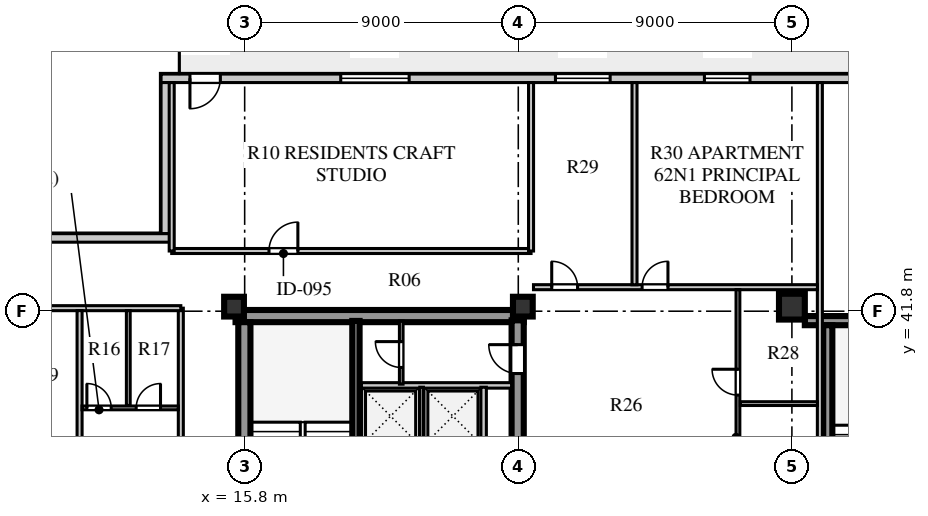
"""IFC4 building model, lengths in metres.
Left out: names, types, materials, properties, quantities, classifications, styles, units other than length and angle.
Written with IfcOpenShell. Run it as: python <this file> out.ifc"""

import sys

from ifc_helpers import new_model, si_unit, direction, frame, frame_2d, origin, origin_2d, place, context, subcontext, project, spatial, rectangle, extrude, element, fill, save


model = new_model("IFC4")
c1 = context("Model", 3, precision=1e-05, world=origin(), true_north=direction((0.0, 1.0)))
c2 = subcontext(c1, "Body", "Model", "MODEL_VIEW")
j1 = project(units=[si_unit("LENGTHUNIT", "METRE"), si_unit("PLANEANGLEUNIT", "RADIAN")], contexts=[c1])
p1 = place(None, origin())
s1 = spatial("IfcSite", under=j1, at=p1, CompositionType="ELEMENT")
p2 = place(p1, origin())
s2 = spatial("IfcBuilding", under=s1, at=p2, CompositionType="ELEMENT")
p3 = place(p2, frame((0.0, 0.0, 253.1)))
s3 = spatial("IfcBuildingStorey", under=s2, at=p3, CompositionType="ELEMENT", Elevation=253.1)
p4 = place(p3, frame((15.5, 41.64, 0.0), z_axis=(0.0, 0.0, 1.0), x_axis=(1.0, 0.0, 0.0)))
e1 = element("IfcWall", 1, at=p4, inside=s3, PredefinedType="SHEAR", context=c2, shape_type="SweptSolid", body=[
    extrude(rectangle(XDim=9.48, YDim=0.4, at=frame_2d((4.74, 0.0))), origin(), (0.0, 0.0, 1.0), 3.66),
])
p5 = place(p3, frame((15.79, 15.81, 0.0), z_axis=(0.0, 0.0, 1.0), x_axis=(0.0, 1.0, 0.0)))
e2 = element("IfcWall", 2, at=p5, inside=s3, PredefinedType="SHEAR", context=c2, shape_type="SweptSolid", body=[
    extrude(rectangle(XDim=25.63, YDim=0.4, at=frame_2d((12.815, 0.0))), origin(), (0.0, 0.0, 1.0), 3.66),
])
p6 = place(p3, frame((24.78, 15.74, 0.0), z_axis=(0.0, 0.0, 1.0), x_axis=(0.0, 1.0, 0.0)))
e3 = element("IfcWall", 3, at=p6, inside=s3, PredefinedType="SHEAR", context=c2, shape_type="SweptSolid", body=[
    extrude(rectangle(XDim=25.76, YDim=0.4, at=frame_2d((12.88, 0.0))), origin(), (0.0, 0.0, 1.0), 3.66),
])
p7 = place(p6, frame((1.61, 0.0, 0.0)))
e4 = element("IfcOpeningElement", 4, at=p7, cuts=e3, PredefinedType="OPENING", context=c2, shape_type="SweptSolid", body=[
    extrude(rectangle(XDim=1.2, YDim=2.1, at=frame_2d((0.6, 1.05))), frame((0.0, 0.21, 0.0), z_axis=(0.0, -1.0, 0.0), x_axis=(1.0, 0.0, 0.0)), (0.0, 0.0, 1.0), 0.42),
])
p8 = place(p6, frame((6.78, 0.0, 0.0)))
e5 = element("IfcOpeningElement", 5, at=p8, cuts=e3, PredefinedType="OPENING", context=c2, shape_type="SweptSolid", body=[
    extrude(rectangle(XDim=0.85, YDim=2.06, at=frame_2d((0.425, 1.03))), frame((0.0, 0.21, 0.0), z_axis=(0.0, -1.0, 0.0), x_axis=(1.0, 0.0, 0.0)), (0.0, 0.0, 1.0), 0.42),
])
p9 = place(p6, frame((12.11, 0.0, 0.0)))
e6 = element("IfcOpeningElement", 6, at=p9, cuts=e3, PredefinedType="OPENING", context=c2, shape_type="SweptSolid", body=[
    extrude(rectangle(XDim=1.5, YDim=2.12, at=frame_2d((0.75, 1.06))), frame((0.0, 0.21, 0.0), z_axis=(0.0, -1.0, 0.0), x_axis=(1.0, 0.0, 0.0)), (0.0, 0.0, 1.0), 0.42),
])
p10 = place(p6, frame((20.11, 0.0, 0.0)))
e7 = element("IfcOpeningElement", 7, at=p10, cuts=e3, PredefinedType="OPENING", context=c2, shape_type="SweptSolid", body=[
    extrude(rectangle(XDim=1.2, YDim=2.12, at=frame_2d((0.6, 1.06))), frame((0.0, 0.21, 0.0), z_axis=(0.0, -1.0, 0.0), x_axis=(1.0, 0.0, 0.0)), (0.0, 0.0, 1.0), 0.42),
])
p11 = place(p6, frame((24.01, 0.0, 0.0)))
e8 = element("IfcOpeningElement", 8, at=p11, cuts=e3, PredefinedType="OPENING", context=c2, shape_type="SweptSolid", body=[
    extrude(rectangle(XDim=0.95, YDim=2.1, at=frame_2d((0.475, 1.05))), frame((0.0, 0.21, 0.0), z_axis=(0.0, -1.0, 0.0), x_axis=(1.0, 0.0, 0.0)), (0.0, 0.0, 1.0), 0.42),
])
p12 = place(p3, frame((34.225, 41.49, 0.0), z_axis=(0.0, 0.0, 1.0), x_axis=(1.0, 0.0, 0.0)))
e9 = element("IfcWall", 9, at=p12, inside=s3, PredefinedType="SHEAR", context=c2, shape_type="SweptSolid", body=[
    extrude(rectangle(XDim=4.645, YDim=0.3, at=frame_2d((2.323, 0.0))), origin(), (0.0, 0.0, 1.0), 3.66),
])
p13 = place(p3, frame((34.98, 33.31, 0.0), z_axis=(0.0, 0.0, 1.0), x_axis=(0.0, 1.0, 0.0)))
e10 = element("IfcWall", 10, at=p13, inside=s3, PredefinedType="SHEAR", context=c2, shape_type="SweptSolid", body=[
    extrude(rectangle(XDim=8.03, YDim=0.3, at=frame_2d((4.015, 0.0))), origin(), (0.0, 0.0, 1.0), 3.66),
])
p14 = place(p13, frame((0.35, 0.0, 0.0)))
e11 = element("IfcOpeningElement", 11, at=p14, cuts=e10, PredefinedType="OPENING", context=c2, shape_type="SweptSolid", body=[
    extrude(rectangle(XDim=1.1, YDim=2.1, at=frame_2d((0.55, 1.05))), frame((0.0, 0.16, 0.0), z_axis=(0.0, -1.0, 0.0), x_axis=(1.0, 0.0, 0.0)), (0.0, 0.0, 1.0), 0.32),
])
for number, where, z_axis, x_axis in (
    (12, (15.45, 41.95, 0.0), (0.0, 0.0, 1.0), (1.0, 0.0, 0.0)),
    (13, (24.95, 41.95, 0.0), (0.0, 0.0, 1.0), (1.0, 0.0, 0.0)),
):
    element("IfcColumn", number, at=place(p3, frame(where, z_axis=z_axis, x_axis=x_axis)), inside=s3, PredefinedType="COLUMN", context=c2, shape_type="SweptSolid", body=[
        extrude(rectangle(XDim=0.65, YDim=0.65, at=origin_2d()), origin(), (0.0, 0.0, 1.0), 3.66),
    ])
p15 = place(p3, frame((33.8, 41.95, 0.0), z_axis=(0.0, 0.0, 1.0), x_axis=(1.0, 0.0, 0.0)))
e14 = element("IfcColumn", 14, at=p15, inside=s3, PredefinedType="COLUMN", context=c2, shape_type="SweptSolid", body=[
    extrude(rectangle(XDim=0.85, YDim=0.85, at=origin_2d()), origin(), (0.0, 0.0, 1.0), 3.66),
])
p16 = place(p3, frame((45.55, 49.46, 0.0), z_axis=(0.0, 0.0, 1.0), x_axis=(-1.0, 0.0, 0.0)))
e15 = element("IfcWall", 15, at=p16, inside=s3, PredefinedType="STANDARD", context=c2, shape_type="SweptSolid", body=[
    extrude(rectangle(XDim=32.5, YDim=0.28, at=frame_2d((16.25, 0.0))), origin(), (0.0, 0.0, 1.0), 3.66),
])
p17 = place(p16, frame((30.55, 0.0, 0.0)))
e16 = element("IfcOpeningElement", 16, at=p17, cuts=e15, PredefinedType="OPENING", context=c2, shape_type="SweptSolid", body=[
    extrude(rectangle(XDim=1.0, YDim=2.05, at=frame_2d((0.5, 1.025))), frame((0.0, 0.15, 0.0), z_axis=(0.0, -1.0, 0.0), x_axis=(1.0, 0.0, 0.0)), (0.0, 0.0, 1.0), 0.3),
])
p18 = place(p16, frame((24.34, 0.0, 0.8)))
e17 = element("IfcOpeningElement", 17, at=p18, cuts=e15, PredefinedType="OPENING", context=c2, shape_type="SweptSolid", body=[
    extrude(rectangle(XDim=2.25, YDim=2.0, at=frame_2d((1.125, 1.0))), frame((0.0, 0.15, 0.0), z_axis=(0.0, -1.0, 0.0), x_axis=(1.0, 0.0, 0.0)), (0.0, 0.0, 1.0), 0.3),
])
p19 = place(p16, frame((17.728, 0.0, 0.8)))
e18 = element("IfcOpeningElement", 18, at=p19, cuts=e15, PredefinedType="OPENING", context=c2, shape_type="SweptSolid", body=[
    extrude(rectangle(XDim=1.8, YDim=2.0, at=frame_2d((0.9, 1.0))), frame((0.0, 0.15, 0.0), z_axis=(0.0, -1.0, 0.0), x_axis=(1.0, 0.0, 0.0)), (0.0, 0.0, 1.0), 0.3),
])
p20 = place(p16, frame((13.128, 0.0, 0.8)))
e19 = element("IfcOpeningElement", 19, at=p20, cuts=e15, PredefinedType="OPENING", context=c2, shape_type="SweptSolid", body=[
    extrude(rectangle(XDim=1.5, YDim=2.0, at=frame_2d((0.75, 1.0))), frame((0.0, 0.15, 0.0), z_axis=(0.0, -1.0, 0.0), x_axis=(1.0, 0.0, 0.0)), (0.0, 0.0, 1.0), 0.3),
])
p21 = place(p16, frame((4.87, 0.0, 0.8)))
e20 = element("IfcOpeningElement", 20, at=p21, cuts=e15, PredefinedType="OPENING", context=c2, shape_type="SweptSolid", body=[
    extrude(rectangle(XDim=1.2, YDim=1.75, at=frame_2d((0.6, 0.875))), frame((0.0, 0.15, 0.0), z_axis=(0.0, -1.0, 0.0), x_axis=(1.0, 0.0, 0.0)), (0.0, 0.0, 1.0), 0.3),
])
p22 = place(p3, frame((13.19, 49.32, 0.0), z_axis=(0.0, 0.0, 1.0), x_axis=(0.0, -1.0, 0.0)))
e21 = element("IfcWall", 21, at=p22, inside=s3, PredefinedType="STANDARD", context=c2, shape_type="SweptSolid", body=[
    extrude(rectangle(XDim=4.97, YDim=0.28, at=frame_2d((2.485, 0.0))), origin(), (0.0, 0.0, 1.0), 3.66),
])
p23 = place(p3, frame((13.33, 44.21, 0.0), z_axis=(0.0, 0.0, 1.0), x_axis=(-1.0, 0.0, 0.0)))
e22 = element("IfcWall", 22, at=p23, inside=s3, PredefinedType="STANDARD", context=c2, shape_type="SweptSolid", body=[
    extrude(rectangle(XDim=5.53, YDim=0.28, at=frame_2d((2.765, 0.0))), origin(), (0.0, 0.0, 1.0), 3.66),
])
p24 = place(p3, frame((19.46, 33.3, 0.0), z_axis=(0.0, 0.0, 1.0), x_axis=(0.0, 1.0, 0.0)))
e23 = element("IfcWall", 23, at=p24, inside=s3, PredefinedType="SHEAR", context=c2, shape_type="SweptSolid", body=[
    extrude(rectangle(XDim=8.18, YDim=0.24, at=frame_2d((4.09, 0.0))), origin(), (0.0, 0.0, 1.0), 3.9),
])
p25 = place(p24, frame((0.65, 0.0, 0.0)))
e24 = element("IfcOpeningElement", 24, at=p25, cuts=e23, PredefinedType="OPENING", context=c2, shape_type="SweptSolid", body=[
    extrude(rectangle(XDim=1.1, YDim=2.1, at=frame_2d((0.55, 1.05))), frame((0.0, 0.13, 0.0), z_axis=(0.0, -1.0, 0.0), x_axis=(1.0, 0.0, 0.0)), (0.0, 0.0, 1.0), 0.26),
])
p26 = place(p3, frame((19.64, 39.36, 0.0), z_axis=(0.0, 0.0, 1.0), x_axis=(1.0, 0.0, 0.0)))
e25 = element("IfcWall", 25, at=p26, inside=s3, PredefinedType="SOLIDWALL", context=c2, shape_type="SweptSolid", body=[
    extrude(rectangle(XDim=4.94, YDim=0.18, at=frame_2d((2.47, 0.0))), origin(), (0.0, 0.0, 1.0), 3.66),
])
p27 = place(p3, frame((21.62, 37.4, 0.0), z_axis=(0.0, 0.0, 1.0), x_axis=(0.0, 1.0, 0.0)))
e26 = element("IfcWall", 26, at=p27, inside=s3, PredefinedType="PARTITIONING", context=c2, shape_type="SweptSolid", body=[
    extrude(rectangle(XDim=1.9, YDim=0.12, at=frame_2d((0.95, 0.0))), origin(), (0.0, 0.0, 1.0), 3.66),
])
p28 = place(p3, frame((23.66, 37.4, 0.0), z_axis=(0.0, 0.0, 1.0), x_axis=(0.0, 1.0, 0.0)))
e27 = element("IfcWall", 27, at=p28, inside=s3, PredefinedType="SOLIDWALL", context=c2, shape_type="SweptSolid", body=[
    extrude(rectangle(XDim=1.9, YDim=0.18, at=frame_2d((0.95, 0.0))), origin(), (0.0, 0.0, 1.0), 3.66),
])
p29 = place(p3, frame((20.95, 39.4, 0.0), z_axis=(0.0, 0.0, 1.0), x_axis=(0.0, 1.0, 0.0)))
e28 = element("IfcWall", 28, at=p29, inside=s3, PredefinedType="PARTITIONING", context=c2, shape_type="SweptSolid", body=[
    extrude(rectangle(XDim=2.08, YDim=0.12, at=frame_2d((1.04, 0.0))), origin(), (0.0, 0.0, 1.0), 3.66),
])
p30 = place(p29, frame((0.55, 0.0, 0.0)))
e29 = element("IfcOpeningElement", 29, at=p30, cuts=e28, PredefinedType="OPENING", context=c2, shape_type="SweptSolid", body=[
    extrude(rectangle(XDim=0.85, YDim=2.06, at=frame_2d((0.425, 1.03))), frame((0.0, 0.07, 0.0), z_axis=(0.0, -1.0, 0.0), x_axis=(1.0, 0.0, 0.0)), (0.0, 0.0, 1.0), 0.14),
])
p31 = place(p3, frame((13.4, 43.78, 0.0), z_axis=(0.0, 0.0, 1.0), x_axis=(1.0, 0.0, 0.0)))
e30 = element("IfcWall", 30, at=p31, inside=s3, PredefinedType="PARTITIONING", context=c2, shape_type="SweptSolid", body=[
    extrude(rectangle(XDim=11.82, YDim=0.165, at=frame_2d((5.91, 0.0))), origin(), (0.0, 0.0, 1.0), 3.66),
])
p32 = place(p31, frame((3.2, 0.0, 0.0)))
e31 = element("IfcOpeningElement", 31, at=p32, cuts=e30, PredefinedType="OPENING", context=c2, shape_type="SweptSolid", body=[
    extrude(rectangle(XDim=0.95, YDim=2.08, at=frame_2d((0.475, 1.04))), frame((0.0, 0.093, 0.0), z_axis=(0.0, -1.0, 0.0), x_axis=(1.0, 0.0, 0.0)), (0.0, 0.0, 1.0), 0.185),
])
p33 = place(p3, frame((13.4, 43.78, 0.0), z_axis=(0.0, 0.0, 1.0), x_axis=(0.0, 1.0, 0.0)))
e32 = element("IfcWall", 32, at=p33, inside=s3, PredefinedType="PARTITIONING", context=c2, shape_type="SweptSolid", body=[
    extrude(rectangle(XDim=5.54, YDim=0.165, at=frame_2d((2.77, 0.0))), origin(), (0.0, 0.0, 1.0), 3.66),
])
p34 = place(p3, frame((25.22, 43.78, 0.0), z_axis=(0.0, 0.0, 1.0), x_axis=(0.0, 1.0, 0.0)))
e33 = element("IfcWall", 33, at=p34, inside=s3, PredefinedType="PARTITIONING", context=c2, shape_type="SweptSolid", body=[
    extrude(rectangle(XDim=5.54, YDim=0.165, at=frame_2d((2.77, 0.0))), origin(), (0.0, 0.0, 1.0), 3.21),
])
p35 = place(p3, frame((13.7, 15.3, 0.0), z_axis=(0.0, 0.0, 1.0), x_axis=(0.0, 1.0, 0.0)))
e34 = element("IfcWall", 34, at=p35, inside=s3, PredefinedType="PARTITIONING", context=c2, shape_type="SweptSolid", body=[
    extrude(rectangle(XDim=26.6, YDim=0.165, at=frame_2d((13.3, 0.0))), origin(), (0.0, 0.0, 1.0), 3.66),
])
p36 = place(p35, frame((0.65, 0.0, 0.0)))
e35 = element("IfcOpeningElement", 35, at=p36, cuts=e34, PredefinedType="OPENING", context=c2, shape_type="SweptSolid", body=[
    extrude(rectangle(XDim=0.95, YDim=2.1, at=frame_2d((0.475, 1.05))), frame((0.0, 0.093, 0.0), z_axis=(0.0, -1.0, 0.0), x_axis=(1.0, 0.0, 0.0)), (0.0, 0.0, 1.0), 0.185),
])
p37 = place(p35, frame((15.95, 0.0, 0.0)))
e36 = element("IfcOpeningElement", 36, at=p37, cuts=e34, PredefinedType="OPENING", context=c2, shape_type="SweptSolid", body=[
    extrude(rectangle(XDim=0.95, YDim=2.1, at=frame_2d((0.475, 1.05))), frame((0.0, 0.093, 0.0), z_axis=(0.0, -1.0, 0.0), x_axis=(1.0, 0.0, 0.0)), (0.0, 0.0, 1.0), 0.185),
])
p38 = place(p3, frame((8.08, 41.9, 0.0), z_axis=(0.0, 0.0, 1.0), x_axis=(1.0, 0.0, 0.0)))
e37 = element("IfcWall", 37, at=p38, inside=s3, PredefinedType="PARTITIONING", context=c2, shape_type="SweptSolid", body=[
    extrude(rectangle(XDim=5.62, YDim=0.165, at=frame_2d((2.81, 0.0))), origin(), (0.0, 0.0, 1.0), 3.21),
])
p39 = place(p3, frame((10.37, 30.68, 0.0), z_axis=(0.0, 0.0, 1.0), x_axis=(0.0, 1.0, 0.0)))
e38 = element("IfcWall", 38, at=p39, inside=s3, PredefinedType="PARTITIONING", context=c2, shape_type="SweptSolid", body=[
    extrude(rectangle(XDim=11.14, YDim=0.165, at=frame_2d((5.57, 0.0))), origin(), (0.0, 0.0, 1.0), 3.66),
])
p40 = place(p39, frame((4.52, 0.0, 0.0)))
e39 = element("IfcOpeningElement", 39, at=p40, cuts=e38, PredefinedType="OPENING", context=c2, shape_type="SweptSolid", body=[
    extrude(rectangle(XDim=0.85, YDim=2.08, at=frame_2d((0.425, 1.04))), frame((0.0, 0.093, 0.0), z_axis=(0.0, -1.0, 0.0), x_axis=(1.0, 0.0, 0.0)), (0.0, 0.0, 1.0), 0.185),
])
p41 = place(p39, frame((5.82, 0.0, 0.0)))
e40 = element("IfcOpeningElement", 40, at=p41, cuts=e38, PredefinedType="OPENING", context=c2, shape_type="SweptSolid", body=[
    extrude(rectangle(XDim=0.85, YDim=2.08, at=frame_2d((0.425, 1.04))), frame((0.0, 0.093, 0.0), z_axis=(0.0, -1.0, 0.0), x_axis=(1.0, 0.0, 0.0)), (0.0, 0.0, 1.0), 0.185),
])
p42 = place(p3, frame((10.45, 38.62, 0.0), z_axis=(0.0, 0.0, 1.0), x_axis=(1.0, 0.0, 0.0)))
e41 = element("IfcWall", 41, at=p42, inside=s3, PredefinedType="PLUMBINGWALL", context=c2, shape_type="SweptSolid", body=[
    extrude(rectangle(XDim=3.17, YDim=0.125, at=frame_2d((1.585, 0.0))), origin(), (0.0, 0.0, 1.0), 3.66),
])
p43 = place(p42, frame((0.16, 0.0, 0.0)))
e42 = element("IfcOpeningElement", 42, at=p43, cuts=e41, PredefinedType="OPENING", context=c2, shape_type="SweptSolid", body=[
    extrude(rectangle(XDim=0.8, YDim=2.05, at=frame_2d((0.4, 1.025))), frame((0.0, 0.073, 0.0), z_axis=(0.0, -1.0, 0.0), x_axis=(1.0, 0.0, 0.0)), (0.0, 0.0, 1.0), 0.145),
])
p44 = place(p42, frame((1.782, 0.0, 0.0)))
e43 = element("IfcOpeningElement", 43, at=p44, cuts=e41, PredefinedType="OPENING", context=c2, shape_type="SweptSolid", body=[
    extrude(rectangle(XDim=0.8, YDim=2.05, at=frame_2d((0.4, 1.025))), frame((0.0, 0.073, 0.0), z_axis=(0.0, -1.0, 0.0), x_axis=(1.0, 0.0, 0.0)), (0.0, 0.0, 1.0), 0.145),
])
p45 = place(p3, frame((11.972, 38.7, 0.0), z_axis=(0.0, 0.0, 1.0), x_axis=(0.0, 1.0, 0.0)))
e44 = element("IfcWall", 44, at=p45, inside=s3, PredefinedType="PLUMBINGWALL", context=c2, shape_type="SweptSolid", body=[
    extrude(rectangle(XDim=3.12, YDim=0.125, at=frame_2d((1.56, 0.0))), origin(), (0.0, 0.0, 1.0), 3.66),
])
p46 = place(p3, frame((34.72, 35.22, 0.0), z_axis=(0.0, 0.0, 1.0), x_axis=(0.0, 1.0, 0.0)))
e45 = element("IfcWall", 45, at=p46, inside=s3, PredefinedType="PARTITIONING", context=c2, shape_type="SweptSolid", body=[
    extrude(rectangle(XDim=14.1, YDim=0.165, at=frame_2d((7.05, 0.0))), origin(), (0.0, 0.0, 1.0), 3.66),
])
p47 = place(p3, frame((25.3, 42.59, 0.0), z_axis=(0.0, 0.0, 1.0), x_axis=(1.0, 0.0, 0.0)))
e46 = element("IfcWall", 46, at=p47, inside=s3, PredefinedType="PARTITIONING", context=c2, shape_type="SweptSolid", body=[
    extrude(rectangle(XDim=9.34, YDim=0.165, at=frame_2d((4.67, 0.0))), origin(), (0.0, 0.0, 1.0), 3.66),
])
p48 = place(p47, frame((0.6, 0.0, 0.0)))
e47 = element("IfcOpeningElement", 47, at=p48, cuts=e46, PredefinedType="OPENING", context=c2, shape_type="SweptSolid", body=[
    extrude(rectangle(XDim=0.85, YDim=2.08, at=frame_2d((0.425, 1.04))), frame((0.0, 0.093, 0.0), z_axis=(0.0, -1.0, 0.0), x_axis=(1.0, 0.0, 0.0)), (0.0, 0.0, 1.0), 0.185),
])
p49 = place(p47, frame((3.573, 0.0, 0.0)))
e48 = element("IfcOpeningElement", 48, at=p49, cuts=e46, PredefinedType="OPENING", context=c2, shape_type="SweptSolid", body=[
    extrude(rectangle(XDim=0.85, YDim=2.08, at=frame_2d((0.425, 1.04))), frame((0.0, 0.093, 0.0), z_axis=(0.0, -1.0, 0.0), x_axis=(1.0, 0.0, 0.0)), (0.0, 0.0, 1.0), 0.185),
])
p50 = place(p3, frame((32.025, 35.3, 0.0), z_axis=(0.0, 0.0, 1.0), x_axis=(0.0, 1.0, 0.0)))
e49 = element("IfcWall", 49, at=p50, inside=s3, PredefinedType="PLUMBINGWALL", context=c2, shape_type="SweptSolid", body=[
    extrude(rectangle(XDim=7.21, YDim=0.125, at=frame_2d((3.605, 0.0))), origin(), (0.0, 0.0, 1.0), 3.66),
])
p51 = place(p50, frame((0.16, 0.0, 0.0)))
e50 = element("IfcOpeningElement", 50, at=p51, cuts=e49, PredefinedType="OPENING", context=c2, shape_type="SweptSolid", body=[
    extrude(rectangle(XDim=0.8, YDim=2.05, at=frame_2d((0.4, 1.025))), frame((0.0, 0.073, 0.0), z_axis=(0.0, -1.0, 0.0), x_axis=(1.0, 0.0, 0.0)), (0.0, 0.0, 1.0), 0.145),
])
p52 = place(p50, frame((3.741, 0.0, 0.0)))
e51 = element("IfcOpeningElement", 51, at=p52, cuts=e49, PredefinedType="OPENING", context=c2, shape_type="SweptSolid", body=[
    extrude(rectangle(XDim=0.85, YDim=2.08, at=frame_2d((0.425, 1.04))), frame((0.0, 0.073, 0.0), z_axis=(0.0, -1.0, 0.0), x_axis=(1.0, 0.0, 0.0)), (0.0, 0.0, 1.0), 0.145),
])
p53 = place(p3, frame((32.105, 38.761, 0.0), z_axis=(0.0, 0.0, 1.0), x_axis=(1.0, 0.0, 0.0)))
e52 = element("IfcWall", 52, at=p53, inside=s3, PredefinedType="PLUMBINGWALL", context=c2, shape_type="SweptSolid", body=[
    extrude(rectangle(XDim=2.535, YDim=0.125, at=frame_2d((1.268, 0.0))), origin(), (0.0, 0.0, 1.0), 3.66),
])
p54 = place(p3, frame((28.623, 42.67, 0.0), z_axis=(0.0, 0.0, 1.0), x_axis=(0.0, 1.0, 0.0)))
e53 = element("IfcWall", 53, at=p54, inside=s3, PredefinedType="PARTITIONING", context=c2, shape_type="SweptSolid", body=[
    extrude(rectangle(XDim=6.65, YDim=0.165, at=frame_2d((3.325, 0.0))), origin(), (0.0, 0.0, 1.0), 3.66),
])
p55 = place(p17, frame((1.0, 0.0, 0.0), z_axis=(0.0, 0.0, 1.0), x_axis=(-1.0, 0.0, 0.0)))
e54 = element("IfcDoor", 54, at=p55, inside=s3, OperationType="SINGLE_SWING_LEFT", PredefinedType="DOOR", context=c2, shape_type="SweptSolid", body=[
    extrude(rectangle(XDim=1.0, YDim=2.05, at=frame_2d((0.5, 1.025))), frame((0.0, 0.025, 0.0), z_axis=(0.0, -1.0, 0.0), x_axis=(1.0, 0.0, 0.0)), (0.0, 0.0, 1.0), 0.05),
])
fill(e16, e54)
p56 = place(p18, origin())
e55 = element("IfcWindow", 55, at=p56, inside=s3, PartitioningType="SINGLE_PANEL", PredefinedType="WINDOW", context=c2, shape_type="SweptSolid", body=[
    extrude(rectangle(XDim=2.25, YDim=2.0, at=frame_2d((1.125, 1.0))), frame((0.0, 0.03, 0.0), z_axis=(0.0, -1.0, 0.0), x_axis=(1.0, 0.0, 0.0)), (0.0, 0.0, 1.0), 0.06),
])
fill(e17, e55)
p57 = place(p19, origin())
e56 = element("IfcWindow", 56, at=p57, inside=s3, PartitioningType="SINGLE_PANEL", PredefinedType="WINDOW", context=c2, shape_type="SweptSolid", body=[
    extrude(rectangle(XDim=1.8, YDim=2.0, at=frame_2d((0.9, 1.0))), frame((0.0, 0.03, 0.0), z_axis=(0.0, -1.0, 0.0), x_axis=(1.0, 0.0, 0.0)), (0.0, 0.0, 1.0), 0.06),
])
fill(e18, e56)
p58 = place(p20, origin())
e57 = element("IfcWindow", 57, at=p58, inside=s3, PartitioningType="SINGLE_PANEL", PredefinedType="WINDOW", context=c2, shape_type="SweptSolid", body=[
    extrude(rectangle(XDim=1.5, YDim=2.0, at=frame_2d((0.75, 1.0))), frame((0.0, 0.03, 0.0), z_axis=(0.0, -1.0, 0.0), x_axis=(1.0, 0.0, 0.0)), (0.0, 0.0, 1.0), 0.06),
])
fill(e19, e57)
p59 = place(p30, origin())
e58 = element("IfcDoor", 58, at=p59, inside=s3, OperationType="SINGLE_SWING_RIGHT", PredefinedType="DOOR", context=c2, shape_type="SweptSolid", body=[
    extrude(rectangle(XDim=0.85, YDim=2.06, at=frame_2d((0.425, 1.03))), frame((0.0, 0.025, 0.0), z_axis=(0.0, -1.0, 0.0), x_axis=(1.0, 0.0, 0.0)), (0.0, 0.0, 1.0), 0.05),
])
fill(e29, e58)
p60 = place(p11, frame((0.95, 0.0, 0.0), z_axis=(0.0, 0.0, 1.0), x_axis=(-1.0, 0.0, 0.0)))
e59 = element("IfcDoor", 59, at=p60, inside=s3, OperationType="SINGLE_SWING_LEFT", PredefinedType="DOOR", context=c2, shape_type="SweptSolid", body=[
    extrude(rectangle(XDim=0.95, YDim=2.1, at=frame_2d((0.475, 1.05))), frame((0.0, 0.025, 0.0), z_axis=(0.0, -1.0, 0.0), x_axis=(1.0, 0.0, 0.0)), (0.0, 0.0, 1.0), 0.05),
])
fill(e8, e59)
p61 = place(p32, origin())
e60 = element("IfcDoor", 60, at=p61, inside=s3, OperationType="SINGLE_SWING_RIGHT", PredefinedType="DOOR", context=c2, shape_type="SweptSolid", body=[
    extrude(rectangle(XDim=0.95, YDim=2.08, at=frame_2d((0.475, 1.04))), frame((0.0, 0.025, 0.0), z_axis=(0.0, -1.0, 0.0), x_axis=(1.0, 0.0, 0.0)), (0.0, 0.0, 1.0), 0.05),
])
fill(e31, e60)
p62 = place(p43, origin())
e61 = element("IfcDoor", 61, at=p62, inside=s3, OperationType="SINGLE_SWING_LEFT", PredefinedType="DOOR", context=c2, shape_type="SweptSolid", body=[
    extrude(rectangle(XDim=0.8, YDim=2.05, at=frame_2d((0.4, 1.025))), frame((0.0, 0.025, 0.0), z_axis=(0.0, -1.0, 0.0), x_axis=(1.0, 0.0, 0.0)), (0.0, 0.0, 1.0), 0.05),
])
fill(e42, e61)
p63 = place(p44, origin())
e62 = element("IfcDoor", 62, at=p63, inside=s3, OperationType="SINGLE_SWING_RIGHT", PredefinedType="DOOR", context=c2, shape_type="SweptSolid", body=[
    extrude(rectangle(XDim=0.8, YDim=2.05, at=frame_2d((0.4, 1.025))), frame((0.0, 0.025, 0.0), z_axis=(0.0, -1.0, 0.0), x_axis=(1.0, 0.0, 0.0)), (0.0, 0.0, 1.0), 0.05),
])
fill(e43, e62)
p64 = place(p52, origin())
e63 = element("IfcDoor", 63, at=p64, inside=s3, OperationType="SINGLE_SWING_RIGHT", PredefinedType="DOOR", context=c2, shape_type="SweptSolid", body=[
    extrude(rectangle(XDim=0.85, YDim=2.08, at=frame_2d((0.425, 1.04))), frame((0.0, 0.025, 0.0), z_axis=(0.0, -1.0, 0.0), x_axis=(1.0, 0.0, 0.0)), (0.0, 0.0, 1.0), 0.05),
])
fill(e51, e63)
p65 = place(p48, origin())
e64 = element("IfcDoor", 64, at=p65, inside=s3, OperationType="SINGLE_SWING_LEFT", PredefinedType="DOOR", context=c2, shape_type="SweptSolid", body=[
    extrude(rectangle(XDim=0.85, YDim=2.08, at=frame_2d((0.425, 1.04))), frame((0.0, 0.025, 0.0), z_axis=(0.0, -1.0, 0.0), x_axis=(1.0, 0.0, 0.0)), (0.0, 0.0, 1.0), 0.05),
])
fill(e47, e64)
p66 = place(p49, origin())
e65 = element("IfcDoor", 65, at=p66, inside=s3, OperationType="SINGLE_SWING_RIGHT", PredefinedType="DOOR", context=c2, shape_type="SweptSolid", body=[
    extrude(rectangle(XDim=0.85, YDim=2.08, at=frame_2d((0.425, 1.04))), frame((0.0, 0.025, 0.0), z_axis=(0.0, -1.0, 0.0), x_axis=(1.0, 0.0, 0.0)), (0.0, 0.0, 1.0), 0.05),
])
fill(e48, e65)
save(model, sys.argv[1])
